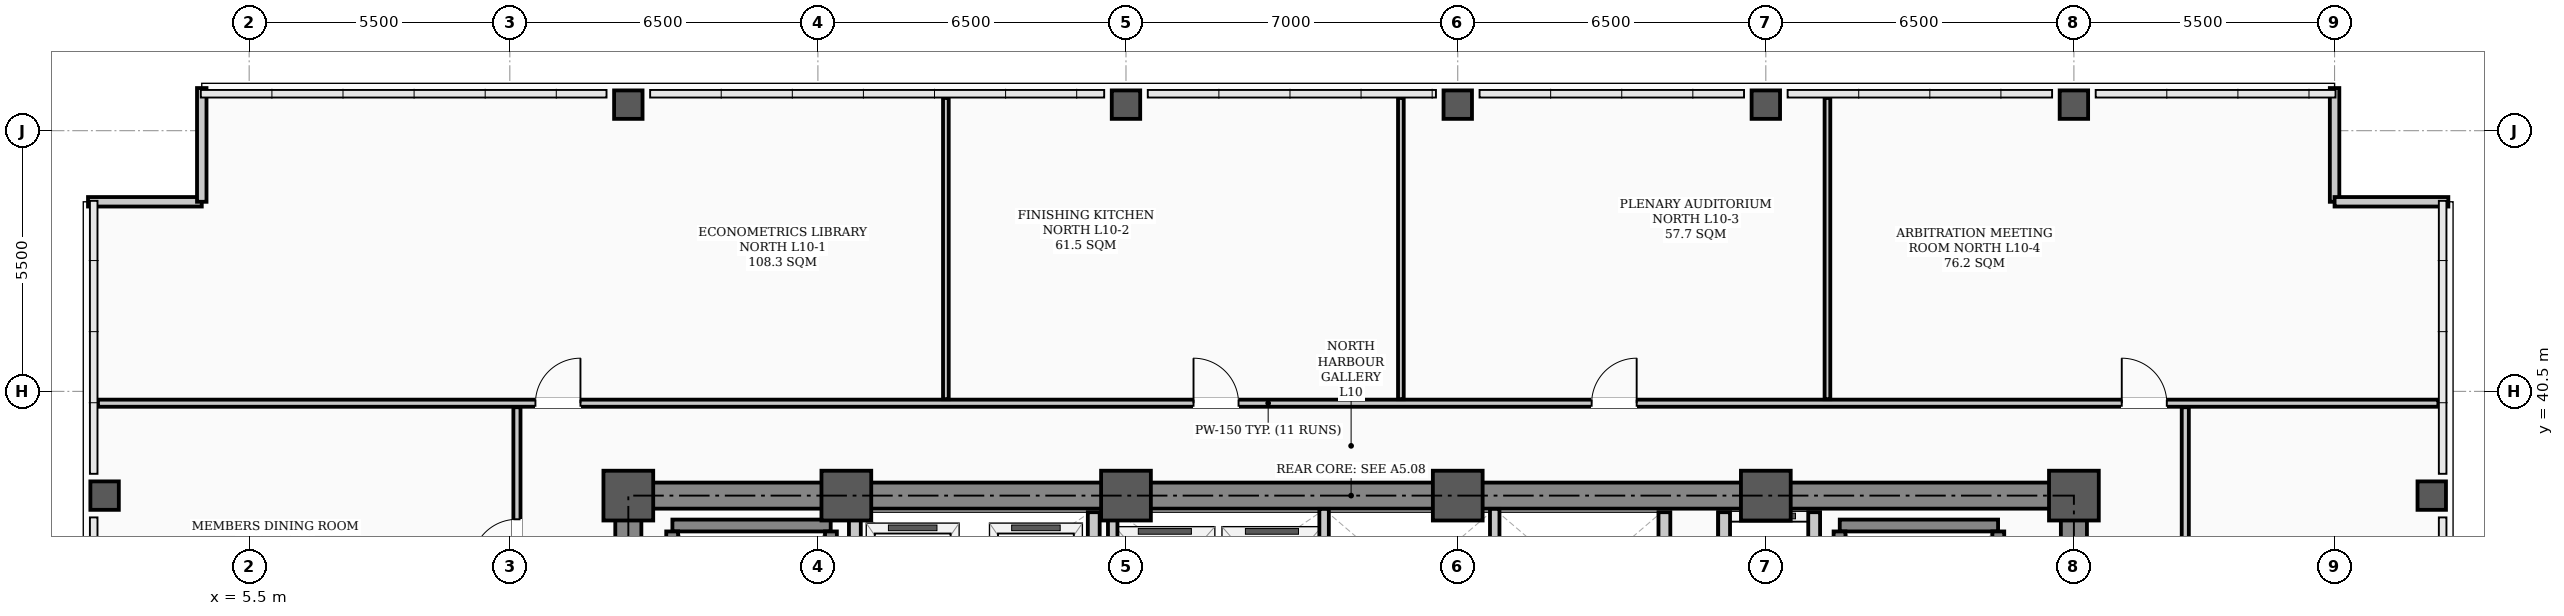
"""IFC4 building model, lengths in metres.
Left out: names, types, materials, properties, quantities, classifications, styles, units other than length and angle.
Written with IfcOpenShell. Run it as: python <this file> out.ifc"""

import sys

from ifc_helpers import new_model, si_unit, direction, frame, frame_2d, origin, origin_2d, place, context, subcontext, project, spatial, rectangle, hollow_rectangle, extrude, element, fill, save


model = new_model("IFC4")
c1 = context("Model", 3, precision=1e-05, world=origin(), true_north=direction((0.0, 1.0)))
c2 = subcontext(c1, "Body", "Model", "MODEL_VIEW")
j1 = project(units=[si_unit("LENGTHUNIT", "METRE"), si_unit("PLANEANGLEUNIT", "RADIAN")], contexts=[c1])
p1 = place(None, origin())
s1 = spatial("IfcSite", under=j1, at=p1, CompositionType="ELEMENT")
p2 = place(p1, origin())
s2 = spatial("IfcBuilding", under=s1, at=p2, CompositionType="ELEMENT")
p3 = place(p2, frame((0.0, 0.0, 42.1)))
s3 = spatial("IfcBuildingStorey", under=s2, at=p3, CompositionType="ELEMENT", Elevation=42.1)
for number, where, z_axis, x_axis in (
    (1, (13.5, 38.3, 0.0), (0.0, 0.0, 1.0), (1.0, 0.0, 0.0)),
    (2, (18.1, 38.3, 0.0), (0.0, 0.0, 1.0), (1.0, 0.0, 0.0)),
    (3, (24.0, 38.3, 0.0), (0.0, 0.0, 1.0), (1.0, 0.0, 0.0)),
    (4, (31.0, 38.3, 0.0), (0.0, 0.0, 1.0), (1.0, 0.0, 0.0)),
    (5, (37.5, 38.3, 0.0), (0.0, 0.0, 1.0), (1.0, 0.0, 0.0)),
    (6, (44.0, 38.3, 0.0), (0.0, 0.0, 1.0), (1.0, 0.0, 0.0)),
):
    element("IfcColumn", number, at=place(p3, frame(where, z_axis=z_axis, x_axis=x_axis)), inside=s3, PredefinedType="COLUMN", context=c2, shape_type="SweptSolid", body=[
        extrude(hollow_rectangle(XDim=1.05, YDim=1.05, WallThickness=0.038, InnerFilletRadius=0.019, OuterFilletRadius=0.057, at=origin_2d()), origin(), (0.0, 0.0, 1.0), 3.9),
    ])
for number, where, z_axis, x_axis in (
    (7, (2.45, 38.3, 0.0), (0.0, 0.0, 1.0), (1.0, 0.0, 0.0)),
    (8, (13.5, 46.55, 0.0), (0.0, 0.0, 1.0), (1.0, 0.0, 0.0)),
    (9, (24.0, 46.55, 0.0), (0.0, 0.0, 1.0), (1.0, 0.0, 0.0)),
    (10, (31.0, 46.55, 0.0), (0.0, 0.0, 1.0), (1.0, 0.0, 0.0)),
    (11, (37.5, 46.55, 0.0), (0.0, 0.0, 1.0), (1.0, 0.0, 0.0)),
    (12, (44.0, 46.55, 0.0), (0.0, 0.0, 1.0), (1.0, 0.0, 0.0)),
    (13, (51.55, 38.3, 0.0), (0.0, 0.0, 1.0), (1.0, 0.0, 0.0)),
):
    element("IfcColumn", number, at=place(p3, frame(where, z_axis=z_axis, x_axis=x_axis)), inside=s3, PredefinedType="COLUMN", context=c2, shape_type="SweptSolid", body=[
        extrude(hollow_rectangle(XDim=0.6, YDim=0.6, WallThickness=0.026, InnerFilletRadius=0.013, OuterFilletRadius=0.039, at=origin_2d()), origin(), (0.0, 0.0, 1.0), 3.9),
    ])
for number, where, z_axis, x_axis in (
    (14, (2.1, 44.5, 0.0), (0.0, 0.0, 1.0), (1.0, 0.0, 0.0)),
    (15, (4.5, 44.5, 0.0), (0.0, 0.0, 1.0), (0.0, 1.0, 0.0)),
    (16, (49.5, 46.9, 0.0), (0.0, 0.0, 1.0), (0.0, -1.0, 0.0)),
    (17, (49.5, 44.5, 0.0), (0.0, 0.0, 1.0), (1.0, 0.0, 0.0)),
):
    element("IfcWall", number, at=place(p3, frame(where, z_axis=z_axis, x_axis=x_axis)), inside=s3, PredefinedType="PARAPET", context=c2, shape_type="SweptSolid", body=[
        extrude(rectangle(XDim=2.4, YDim=0.2, at=frame_2d((1.2, 0.0))), origin(), (0.0, 0.0, 1.0), 1.2),
    ])
p4 = place(p3, frame((13.5, 38.3, 0.0), z_axis=(0.0, 0.0, 1.0), x_axis=(1.0, 0.0, 0.0)))
e18 = element("IfcWall", 18, at=p4, inside=s3, PredefinedType="SHEAR", context=c2, shape_type="SweptSolid", body=[
    extrude(rectangle(XDim=30.5, YDim=0.55, at=frame_2d((15.25, 0.0))), origin(), (0.0, 0.0, 1.0), 3.72),
])
for number, where, z_axis, x_axis in (
    (19, (13.5, 29.35, 0.0), (0.0, 0.0, 1.0), (0.0, 1.0, 0.0)),
    (20, (44.0, 29.35, 0.0), (0.0, 0.0, 1.0), (0.0, 1.0, 0.0)),
):
    element("IfcWall", number, at=place(p3, frame(where, z_axis=z_axis, x_axis=x_axis)), inside=s3, PredefinedType="SHEAR", context=c2, shape_type="SweptSolid", body=[
        extrude(rectangle(XDim=8.6, YDim=0.55, at=frame_2d((4.3, 0.0))), origin(), (0.0, 0.0, 1.0), 3.72),
    ])
p5 = place(p3, frame((14.43, 37.669, 0.0), z_axis=(0.0, 0.0, 1.0), x_axis=(1.0, 0.0, 0.0)))
e21 = element("IfcWall", 21, at=p5, inside=s3, PredefinedType="STANDARD", context=c2, shape_type="SweptSolid", body=[
    extrude(rectangle(XDim=3.34, YDim=0.25, at=frame_2d((1.67, 0.0))), origin(), (0.0, 0.0, 1.0), 3.72),
])
for number, where, z_axis, x_axis in (
    (22, (14.425, 30.36, 0.0), (0.0, 0.0, 1.0), (0.0, 1.0, 0.0)),
    (23, (17.775, 30.36, 0.0), (0.0, 0.0, 1.0), (0.0, 1.0, 0.0)),
):
    element("IfcWall", number, at=place(p3, frame(where, z_axis=z_axis, x_axis=x_axis)), inside=s3, PredefinedType="STANDARD", context=c2, shape_type="SweptSolid", body=[
        extrude(rectangle(XDim=7.184, YDim=0.25, at=frame_2d((3.592, 0.0))), origin(), (0.0, 0.0, 1.0), 3.72),
    ])
p6 = place(p3, frame((39.06, 37.669, 0.0), z_axis=(0.0, 0.0, 1.0), x_axis=(1.0, 0.0, 0.0)))
e24 = element("IfcWall", 24, at=p6, inside=s3, PredefinedType="STANDARD", context=c2, shape_type="SweptSolid", body=[
    extrude(rectangle(XDim=3.34, YDim=0.25, at=frame_2d((1.67, 0.0))), origin(), (0.0, 0.0, 1.0), 3.72),
])
for number, where, z_axis, x_axis in (
    (25, (39.055, 30.36, 0.0), (0.0, 0.0, 1.0), (0.0, 1.0, 0.0)),
    (26, (42.405, 30.36, 0.0), (0.0, 0.0, 1.0), (0.0, 1.0, 0.0)),
):
    element("IfcWall", number, at=place(p3, frame(where, z_axis=z_axis, x_axis=x_axis)), inside=s3, PredefinedType="STANDARD", context=c2, shape_type="SweptSolid", body=[
        extrude(rectangle(XDim=7.184, YDim=0.25, at=frame_2d((3.592, 0.0))), origin(), (0.0, 0.0, 1.0), 3.72),
    ])
p7 = place(p3, frame((36.62, 31.95, 0.0), z_axis=(0.0, 0.0, 1.0), x_axis=(0.0, 1.0, 0.0)))
e27 = element("IfcWall", 27, at=p7, inside=s3, PredefinedType="STANDARD", context=c2, shape_type="SweptSolid", body=[
    extrude(rectangle(XDim=6.0, YDim=0.25, at=frame_2d((3.0, 0.0))), origin(), (0.0, 0.0, 1.0), 3.3),
])
p8 = place(p7, frame((0.9, 0.0, 0.0)))
e28 = element("IfcOpeningElement", 28, at=p8, cuts=e27, PredefinedType="OPENING", context=c2, shape_type="SweptSolid", body=[
    extrude(rectangle(XDim=1.1, YDim=2.08, at=frame_2d((0.55, 1.04))), frame((0.0, 0.135, 0.0), z_axis=(0.0, -1.0, 0.0), x_axis=(1.0, 0.0, 0.0)), (0.0, 0.0, 1.0), 0.27),
])
p9 = place(p7, frame((4.0, 0.0, 0.0)))
e29 = element("IfcOpeningElement", 29, at=p9, cuts=e27, PredefinedType="OPENING", context=c2, shape_type="SweptSolid", body=[
    extrude(rectangle(XDim=1.1, YDim=2.08, at=frame_2d((0.55, 1.04))), frame((0.0, 0.135, 0.0), z_axis=(0.0, -1.0, 0.0), x_axis=(1.0, 0.0, 0.0)), (0.0, 0.0, 1.0), 0.27),
])
p10 = place(p3, frame((38.52, 31.95, 0.0), z_axis=(0.0, 0.0, 1.0), x_axis=(0.0, 1.0, 0.0)))
e30 = element("IfcWall", 30, at=p10, inside=s3, PredefinedType="STANDARD", context=c2, shape_type="SweptSolid", body=[
    extrude(rectangle(XDim=6.0, YDim=0.25, at=frame_2d((3.0, 0.0))), origin(), (0.0, 0.0, 1.0), 3.3),
])
for number, where, z_axis, x_axis in (
    (31, (18.28, 34.62, 0.0), (0.0, 0.0, 1.0), (0.0, 1.0, 0.0)),
    (32, (23.32, 34.62, 0.0), (0.0, 0.0, 1.0), (0.0, 1.0, 0.0)),
):
    element("IfcWall", number, at=place(p3, frame(where, z_axis=z_axis, x_axis=x_axis)), inside=s3, PredefinedType="STANDARD", context=c2, shape_type="SweptSolid", body=[
        extrude(rectangle(XDim=3.33, YDim=0.25, at=frame_2d((1.665, 0.0))), origin(), (0.0, 0.0, 1.0), 3.3),
    ])
p11 = place(p3, frame((35.36, 34.9, 0.0), z_axis=(0.0, 0.0, 1.0), x_axis=(0.0, 1.0, 0.0)))
e33 = element("IfcWall", 33, at=p11, inside=s3, PredefinedType="STANDARD", context=c2, shape_type="SweptSolid", body=[
    extrude(rectangle(XDim=3.05, YDim=0.25, at=frame_2d((1.525, 0.0))), origin(), (0.0, 0.0, 1.0), 3.3),
])
p12 = place(p3, frame((2.31, 40.25, 0.0), z_axis=(0.0, 0.0, 1.0), x_axis=(1.0, 0.0, 0.0)))
e34 = element("IfcWall", 34, at=p12, inside=s3, PredefinedType="PARTITIONING", context=c2, shape_type="SweptSolid", body=[
    extrude(rectangle(XDim=49.38, YDim=0.15, at=frame_2d((24.69, 0.0))), origin(), (0.0, 0.0, 1.0), 3.1),
])
p13 = place(p12, frame((9.23, 0.0, 0.0)))
e35 = element("IfcOpeningElement", 35, at=p13, cuts=e34, PredefinedType="OPENING", context=c2, shape_type="SweptSolid", body=[
    extrude(rectangle(XDim=0.95, YDim=2.08, at=frame_2d((0.475, 1.04))), frame((0.0, 0.085, 0.0), z_axis=(0.0, -1.0, 0.0), x_axis=(1.0, 0.0, 0.0)), (0.0, 0.0, 1.0), 0.17),
])
p14 = place(p12, frame((23.115, 0.0, 0.0)))
e36 = element("IfcOpeningElement", 36, at=p14, cuts=e34, PredefinedType="OPENING", context=c2, shape_type="SweptSolid", body=[
    extrude(rectangle(XDim=0.95, YDim=2.08, at=frame_2d((0.475, 1.04))), frame((0.0, 0.085, 0.0), z_axis=(0.0, -1.0, 0.0), x_axis=(1.0, 0.0, 0.0)), (0.0, 0.0, 1.0), 0.17),
])
p15 = place(p12, frame((31.515, 0.0, 0.0)))
e37 = element("IfcOpeningElement", 37, at=p15, cuts=e34, PredefinedType="OPENING", context=c2, shape_type="SweptSolid", body=[
    extrude(rectangle(XDim=0.95, YDim=2.08, at=frame_2d((0.475, 1.04))), frame((0.0, 0.085, 0.0), z_axis=(0.0, -1.0, 0.0), x_axis=(1.0, 0.0, 0.0)), (0.0, 0.0, 1.0), 0.17),
])
p16 = place(p12, frame((42.7, 0.0, 0.0)))
e38 = element("IfcOpeningElement", 38, at=p16, cuts=e34, PredefinedType="OPENING", context=c2, shape_type="SweptSolid", body=[
    extrude(rectangle(XDim=0.95, YDim=2.08, at=frame_2d((0.475, 1.04))), frame((0.0, 0.085, 0.0), z_axis=(0.0, -1.0, 0.0), x_axis=(1.0, 0.0, 0.0)), (0.0, 0.0, 1.0), 0.17),
])
p17 = place(p3, frame((11.15, 17.635, 0.0), z_axis=(0.0, 0.0, 1.0), x_axis=(0.0, 1.0, 0.0)))
e39 = element("IfcWall", 39, at=p17, inside=s3, PredefinedType="PARTITIONING", context=c2, shape_type="SweptSolid", body=[
    extrude(rectangle(XDim=22.53, YDim=0.15, at=frame_2d((11.265, 0.0))), origin(), (0.0, 0.0, 1.0), 3.0),
])
p18 = place(p17, frame((4.565, 0.0, 0.0)))
e40 = element("IfcOpeningElement", 40, at=p18, cuts=e39, PredefinedType="OPENING", context=c2, shape_type="SweptSolid", body=[
    extrude(rectangle(XDim=0.95, YDim=2.08, at=frame_2d((0.475, 1.04))), frame((0.0, 0.085, 0.0), z_axis=(0.0, -1.0, 0.0), x_axis=(1.0, 0.0, 0.0)), (0.0, 0.0, 1.0), 0.17),
])
p19 = place(p17, frame((12.99, 0.0, 0.0)))
e41 = element("IfcOpeningElement", 41, at=p19, cuts=e39, PredefinedType="OPENING", context=c2, shape_type="SweptSolid", body=[
    extrude(rectangle(XDim=0.95, YDim=2.08, at=frame_2d((0.475, 1.04))), frame((0.0, 0.085, 0.0), z_axis=(0.0, -1.0, 0.0), x_axis=(1.0, 0.0, 0.0)), (0.0, 0.0, 1.0), 0.17),
])
p20 = place(p17, frame((19.215, 0.0, 0.0)))
e42 = element("IfcOpeningElement", 42, at=p20, cuts=e39, PredefinedType="OPENING", context=c2, shape_type="SweptSolid", body=[
    extrude(rectangle(XDim=0.95, YDim=2.08, at=frame_2d((0.475, 1.04))), frame((0.0, 0.085, 0.0), z_axis=(0.0, -1.0, 0.0), x_axis=(1.0, 0.0, 0.0)), (0.0, 0.0, 1.0), 0.17),
])
p21 = place(p3, frame((46.35, 17.635, 0.0), z_axis=(0.0, 0.0, 1.0), x_axis=(0.0, 1.0, 0.0)))
e43 = element("IfcWall", 43, at=p21, inside=s3, PredefinedType="PARTITIONING", context=c2, shape_type="SweptSolid", body=[
    extrude(rectangle(XDim=22.53, YDim=0.15, at=frame_2d((11.265, 0.0))), origin(), (0.0, 0.0, 1.0), 3.0),
])
p22 = place(p21, frame((5.415, 0.0, 0.0)))
e44 = element("IfcOpeningElement", 44, at=p22, cuts=e43, PredefinedType="OPENING", context=c2, shape_type="SweptSolid", body=[
    extrude(rectangle(XDim=0.95, YDim=2.08, at=frame_2d((0.475, 1.04))), frame((0.0, 0.085, 0.0), z_axis=(0.0, -1.0, 0.0), x_axis=(1.0, 0.0, 0.0)), (0.0, 0.0, 1.0), 0.17),
])
p23 = place(p21, frame((16.765, 0.0, 0.0)))
e45 = element("IfcOpeningElement", 45, at=p23, cuts=e43, PredefinedType="OPENING", context=c2, shape_type="SweptSolid", body=[
    extrude(rectangle(XDim=0.95, YDim=2.08, at=frame_2d((0.475, 1.04))), frame((0.0, 0.085, 0.0), z_axis=(0.0, -1.0, 0.0), x_axis=(1.0, 0.0, 0.0)), (0.0, 0.0, 1.0), 0.17),
])
for number, where, z_axis, x_axis in (
    (46, (20.2, 40.335, 0.0), (0.0, 0.0, 1.0), (0.0, 1.0, 0.0)),
    (47, (29.8, 40.335, 0.0), (0.0, 0.0, 1.0), (0.0, 1.0, 0.0)),
    (48, (38.8, 40.335, 0.0), (0.0, 0.0, 1.0), (0.0, 1.0, 0.0)),
):
    element("IfcWall", number, at=place(p3, frame(where, z_axis=z_axis, x_axis=x_axis)), inside=s3, PredefinedType="PARTITIONING", context=c2, shape_type="SweptSolid", body=[
        extrude(rectangle(XDim=6.355, YDim=0.12, at=frame_2d((3.177, 0.0))), origin(), (0.0, 0.0, 1.0), 3.212),
    ])
p24 = place(p3, frame((23.72, 34.9, 0.0), z_axis=(0.0, 0.0, 1.0), x_axis=(0.0, 1.0, 0.0)))
e49 = element("IfcWall", 49, at=p24, inside=s3, PredefinedType="STANDARD", context=c2, shape_type="SweptSolid", body=[
    extrude(rectangle(XDim=3.12, YDim=0.2, at=frame_2d((1.56, 0.0))), origin(), (0.0, 0.0, 1.0), 3.1),
])
for number, where, z_axis, x_axis in (
    (50, (28.18, 34.9, 0.0), (0.0, 0.0, 1.0), (0.0, 1.0, 0.0)),
    (51, (31.78, 34.9, 0.0), (0.0, 0.0, 1.0), (0.0, 1.0, 0.0)),
):
    element("IfcWall", number, at=place(p3, frame(where, z_axis=z_axis, x_axis=x_axis)), inside=s3, PredefinedType="STANDARD", context=c2, shape_type="SweptSolid", body=[
        extrude(rectangle(XDim=3.12, YDim=0.2, at=frame_2d((1.56, 0.0))), origin(), (0.0, 0.0, 1.0), 3.3),
    ])
p25 = place(p20, origin())
e52 = element("IfcDoor", 52, at=p25, inside=s3, OperationType="SINGLE_SWING_LEFT", PredefinedType="DOOR", context=c2, shape_type="SweptSolid", body=[
    extrude(rectangle(XDim=0.95, YDim=2.08, at=frame_2d((0.475, 1.04))), frame((0.0, 0.025, 0.0), z_axis=(0.0, -1.0, 0.0), x_axis=(1.0, 0.0, 0.0)), (0.0, 0.0, 1.0), 0.05),
])
fill(e42, e52)
p26 = place(p13, origin())
e53 = element("IfcDoor", 53, at=p26, inside=s3, OperationType="SINGLE_SWING_RIGHT", PredefinedType="DOOR", context=c2, shape_type="SweptSolid", body=[
    extrude(rectangle(XDim=0.95, YDim=2.08, at=frame_2d((0.475, 1.04))), frame((0.0, 0.025, 0.0), z_axis=(0.0, -1.0, 0.0), x_axis=(1.0, 0.0, 0.0)), (0.0, 0.0, 1.0), 0.05),
])
fill(e35, e53)
p27 = place(p14, origin())
e54 = element("IfcDoor", 54, at=p27, inside=s3, OperationType="SINGLE_SWING_LEFT", PredefinedType="DOOR", context=c2, shape_type="SweptSolid", body=[
    extrude(rectangle(XDim=0.95, YDim=2.08, at=frame_2d((0.475, 1.04))), frame((0.0, 0.025, 0.0), z_axis=(0.0, -1.0, 0.0), x_axis=(1.0, 0.0, 0.0)), (0.0, 0.0, 1.0), 0.05),
])
fill(e36, e54)
p28 = place(p15, origin())
e55 = element("IfcDoor", 55, at=p28, inside=s3, OperationType="SINGLE_SWING_RIGHT", PredefinedType="DOOR", context=c2, shape_type="SweptSolid", body=[
    extrude(rectangle(XDim=0.95, YDim=2.08, at=frame_2d((0.475, 1.04))), frame((0.0, 0.025, 0.0), z_axis=(0.0, -1.0, 0.0), x_axis=(1.0, 0.0, 0.0)), (0.0, 0.0, 1.0), 0.05),
])
fill(e37, e55)
p29 = place(p16, origin())
e56 = element("IfcDoor", 56, at=p29, inside=s3, OperationType="SINGLE_SWING_LEFT", PredefinedType="DOOR", context=c2, shape_type="SweptSolid", body=[
    extrude(rectangle(XDim=0.95, YDim=2.08, at=frame_2d((0.475, 1.04))), frame((0.0, 0.025, 0.0), z_axis=(0.0, -1.0, 0.0), x_axis=(1.0, 0.0, 0.0)), (0.0, 0.0, 1.0), 0.05),
])
fill(e38, e56)
save(model, sys.argv[1])
